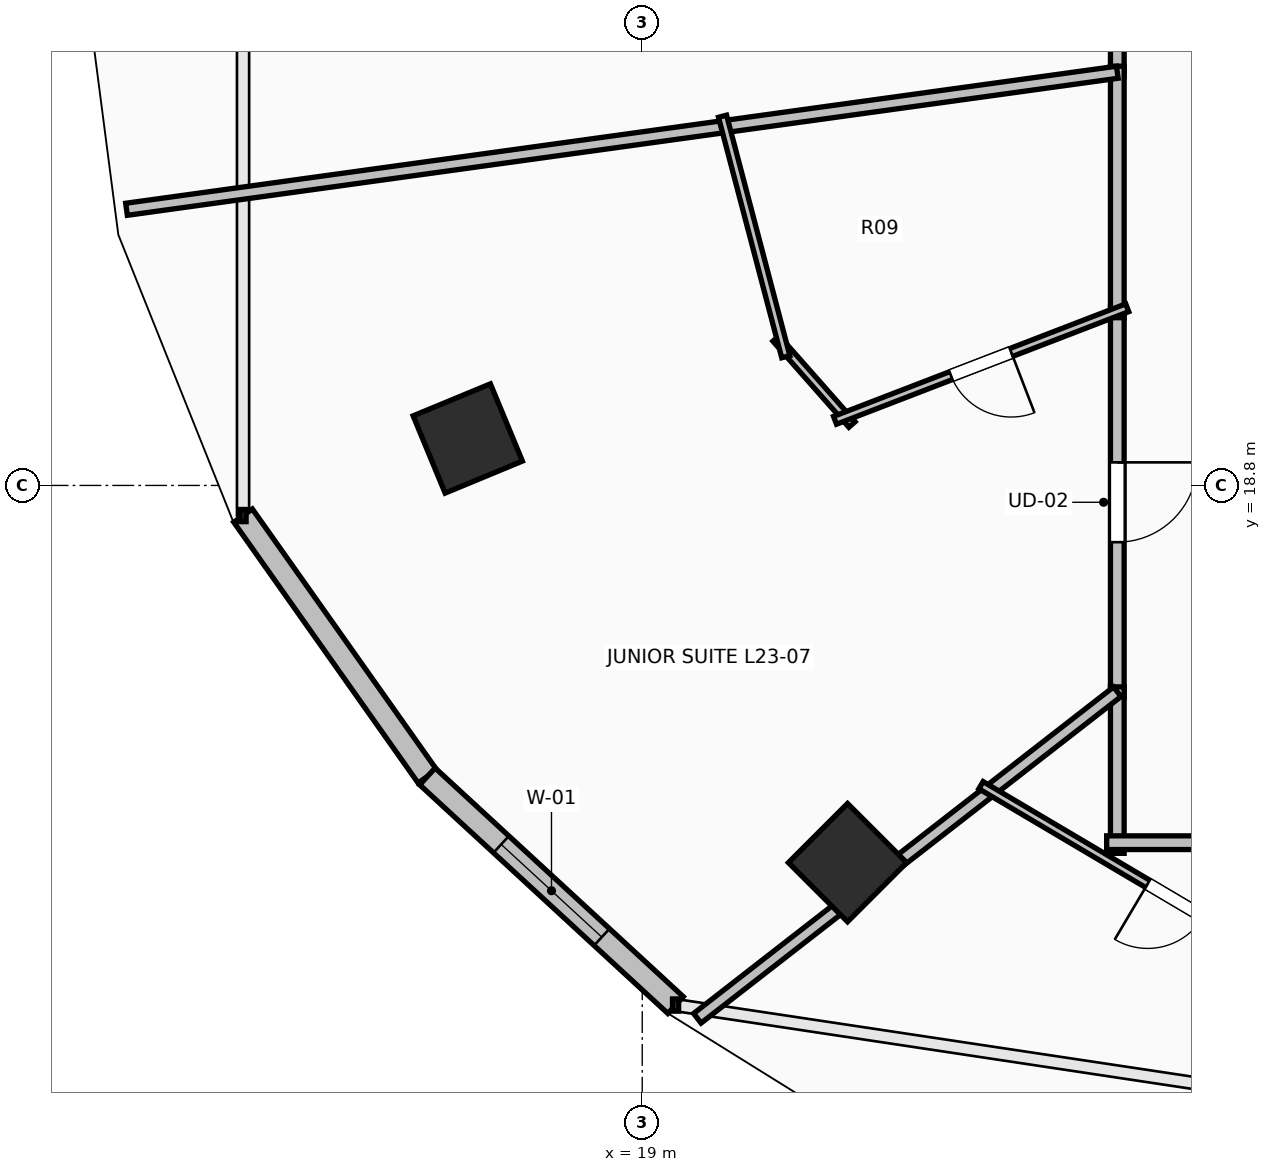
"""IFC4 building model, lengths in metres.
Left out: names, types, materials, properties, quantities, classifications, styles, units other than length and angle.
Written with IfcOpenShell. Run it as: python <this file> out.ifc"""

import sys

from ifc_helpers import new_model, si_unit, direction, frame, frame_2d, origin, origin_2d, place, context, subcontext, project, spatial, rectangle, extrude, element, fill, save


model = new_model("IFC4")
c1 = context("Model", 3, precision=1e-05, world=origin(), true_north=direction((0.0, 1.0)))
c2 = subcontext(c1, "Body", "Model", "MODEL_VIEW")
j1 = project(units=[si_unit("LENGTHUNIT", "METRE"), si_unit("PLANEANGLEUNIT", "RADIAN")], contexts=[c1])
p1 = place(None, origin())
s1 = spatial("IfcSite", under=j1, at=p1, CompositionType="ELEMENT")
p2 = place(p1, origin())
s2 = spatial("IfcBuilding", under=s1, at=p2, CompositionType="ELEMENT")
p3 = place(p2, frame((0.0, 0.0, 89.3)))
s3 = spatial("IfcBuildingStorey", under=s2, at=p3, CompositionType="ELEMENT", Elevation=89.3)
for number, where, z_axis, x_axis in (
    (1, (16.705, 19.418, 0.0), (0.0, 0.0, 1.0), (-0.924, -0.383, 0.0)),
    (2, (21.701, 13.838, 0.0), (0.0, 0.0, 1.0), (-0.707, -0.707, 0.0)),
):
    element("IfcColumn", number, at=place(p3, frame(where, z_axis=z_axis, x_axis=x_axis)), inside=s3, PredefinedType="COLUMN", context=c2, shape_type="SweptSolid", body=[
        extrude(rectangle(XDim=1.1, YDim=1.1, at=origin_2d()), origin(), (0.0, 0.0, 1.0), 3.5),
    ])
p4 = place(p3, frame((13.748, 18.404, 0.0), z_axis=(0.0, 0.0, 1.0), x_axis=(0.57716435238, -0.81662801222, 0.0)))
e3 = element("IfcWall", 3, at=p4, inside=s3, PredefinedType="STANDARD", context=c2, shape_type="SweptSolid", body=[
    extrude(rectangle(XDim=4.202, YDim=0.3, at=frame_2d((2.101, 0.0))), origin(), (0.0, 0.0, 1.0), 3.24),
])
p5 = place(p3, frame((16.174, 14.972, 0.0), z_axis=(0.0, 0.0, 1.0), x_axis=(0.735416718093, -0.677615119924, 0.0)))
e4 = element("IfcWall", 4, at=p5, inside=s3, PredefinedType="STANDARD", context=c2, shape_type="SweptSolid", body=[
    extrude(rectangle(XDim=4.439, YDim=0.3, at=frame_2d((2.22, 0.0))), origin(), (0.0, 0.0, 1.0), 3.24),
])
p6 = place(p5, frame((1.32, 0.0, 0.85)))
e5 = element("IfcOpeningElement", 5, at=p6, cuts=e4, PredefinedType="OPENING", context=c2, shape_type="SweptSolid", body=[
    extrude(rectangle(XDim=1.8, YDim=2.19, at=frame_2d((0.9, 1.095))), frame((0.0, 0.165, 0.0), z_axis=(0.0, -1.0, 0.0), x_axis=(1.0, 0.0, 0.0)), (0.0, 0.0, 1.0), 0.33),
])
p7 = place(p3, frame((25.25, 28.065, 0.0), z_axis=(0.0, 0.0, 1.0), x_axis=(0.0, -1.0, 0.0)))
e6 = element("IfcWall", 6, at=p7, inside=s3, PredefinedType="PARTITIONING", context=c2, shape_type="SweptSolid", body=[
    extrude(rectangle(XDim=3.89, YDim=0.18, at=frame_2d((1.945, 0.0))), origin(), (0.0, 0.0, 1.0), 2.432),
])
p8 = place(p7, frame((1.42, 0.0, 0.0)))
e7 = element("IfcOpeningElement", 7, at=p8, cuts=e6, PredefinedType="OPENING", context=c2, shape_type="SweptSolid", body=[
    extrude(rectangle(XDim=1.05, YDim=2.2, at=frame_2d((0.525, 1.1))), frame((0.0, 0.105, 0.0), z_axis=(0.0, -1.0, 0.0), x_axis=(1.0, 0.0, 0.0)), (0.0, 0.0, 1.0), 0.21),
])
p9 = place(p3, frame((25.25, 21.147, 0.0), z_axis=(0.0, 0.0, 1.0), x_axis=(0.0, -1.0, 0.0)))
e8 = element("IfcWall", 8, at=p9, inside=s3, PredefinedType="PARTITIONING", context=c2, shape_type="SweptSolid", body=[
    extrude(rectangle(XDim=5.137, YDim=0.18, at=frame_2d((2.568, 0.0))), origin(), (0.0, 0.0, 1.0), 2.432),
])
p10 = place(p9, frame((2.043, 0.0, 0.0)))
e9 = element("IfcOpeningElement", 9, at=p10, cuts=e8, PredefinedType="OPENING", context=c2, shape_type="SweptSolid", body=[
    extrude(rectangle(XDim=1.05, YDim=2.2, at=frame_2d((0.525, 1.1))), frame((0.0, 0.105, 0.0), z_axis=(0.0, -1.0, 0.0), x_axis=(1.0, 0.0, 0.0)), (0.0, 0.0, 1.0), 0.21),
])
p11 = place(p3, frame((25.25, 24.315, 0.0), z_axis=(0.0, 0.0, 1.0), x_axis=(0.0, -1.0, 0.0)))
e10 = element("IfcWall", 10, at=p11, inside=s3, PredefinedType="PARTITIONING", context=c2, shape_type="SweptSolid", body=[
    extrude(rectangle(XDim=3.308, YDim=0.18, at=frame_2d((1.654, 0.0))), origin(), (0.0, 0.0, 1.0), 3.24),
])
p12 = place(p3, frame((25.25, 16.15, 0.0), z_axis=(0.0, 0.0, 1.0), x_axis=(0.0, -1.0, 0.0)))
e11 = element("IfcWall", 11, at=p12, inside=s3, PredefinedType="PARTITIONING", context=c2, shape_type="SweptSolid", body=[
    extrude(rectangle(XDim=2.19, YDim=0.18, at=frame_2d((1.095, 0.0))), origin(), (0.0, 0.0, 1.0), 2.432),
])
p13 = place(p3, frame((25.11, 14.1, 0.0), z_axis=(0.0, 0.0, 1.0), x_axis=(1.0, 0.0, 0.0)))
e12 = element("IfcWall", 12, at=p13, inside=s3, PredefinedType="PARTITIONING", context=c2, shape_type="SweptSolid", body=[
    extrude(rectangle(XDim=4.519, YDim=0.18, at=frame_2d((2.259, 0.0))), origin(), (0.0, 0.0, 1.0), 2.432),
])
p14 = place(p3, frame((12.215, 22.433, 0.0), z_axis=(0.0, 0.0, 1.0), x_axis=(0.990569013426, 0.137014705927, 0.0)))
e13 = element("IfcWall", 13, at=p14, inside=s3, PredefinedType="PARTITIONING", context=c2, shape_type="SweptSolid", body=[
    extrude(rectangle(XDim=13.159, YDim=0.16, at=frame_2d((6.58, 0.0))), origin(), (0.0, 0.0, 1.0), 2.677),
])
p15 = place(p3, frame((21.76, 19.602, 0.0), z_axis=(0.0, 0.0, 1.0), x_axis=(-0.661931735756, 0.749564124808, 0.0)))
e14 = element("IfcWall", 14, at=p15, inside=s3, PredefinedType="PARTITIONING", context=c2, shape_type="SweptSolid", body=[
    extrude(rectangle(XDim=1.51, YDim=0.11, at=frame_2d((0.755, 0.0))), origin(), (0.0, 0.0, 1.0), 3.24),
])
p16 = place(p3, frame((20.889, 20.494, 0.0), z_axis=(0.0, 0.0, 1.0), x_axis=(-0.254405137241, 0.967097733502, 0.0)))
e15 = element("IfcWall", 15, at=p16, inside=s3, PredefinedType="PARTITIONING", context=c2, shape_type="SweptSolid", body=[
    extrude(rectangle(XDim=3.271, YDim=0.11, at=frame_2d((1.636, 0.0))), origin(), (0.0, 0.0, 1.0), 2.922),
])
p17 = place(p3, frame((25.381, 21.137, 0.0), z_axis=(0.0, 0.0, 1.0), x_axis=(-0.933189718051, -0.359384126144, 0.0)))
e16 = element("IfcWall", 16, at=p17, inside=s3, PredefinedType="PARTITIONING", context=c2, shape_type="SweptSolid", body=[
    extrude(rectangle(XDim=4.119, YDim=0.11, at=frame_2d((2.06, 0.0))), origin(), (0.0, 0.0, 1.0), 2.972),
])
p18 = place(p17, frame((1.635, 0.0, 0.0)))
e17 = element("IfcOpeningElement", 17, at=p18, cuts=e16, PredefinedType="OPENING", context=c2, shape_type="SweptSolid", body=[
    extrude(rectangle(XDim=0.85, YDim=2.1, at=frame_2d((0.425, 1.05))), frame((0.0, 0.07, 0.0), z_axis=(0.0, -1.0, 0.0), x_axis=(1.0, 0.0, 0.0)), (0.0, 0.0, 1.0), 0.14),
])
p19 = place(p3, frame((19.725, 11.79, 0.0), z_axis=(0.0, 0.0, 1.0), x_axis=(0.789438616042, 0.613829513384, 0.0)))
e18 = element("IfcWall", 18, at=p19, inside=s3, PredefinedType="PARTITIONING", context=c2, shape_type="SweptSolid", body=[
    extrude(rectangle(XDim=6.999, YDim=0.16, at=frame_2d((3.499, 0.0))), origin(), (0.0, 0.0, 1.0), 2.432),
])
p20 = place(p3, frame((27.611, 12.399, 0.0), z_axis=(0.0, 0.0, 1.0), x_axis=(-0.860667615303, 0.509167218081, 0.0)))
e19 = element("IfcWall", 19, at=p20, inside=s3, PredefinedType="PARTITIONING", context=c2, shape_type="SweptSolid", body=[
    extrude(rectangle(XDim=4.827, YDim=0.11, at=frame_2d((2.413, 0.0))), origin(), (0.0, 0.0, 1.0), 2.432),
])
p21 = place(p20, frame((1.428, 0.0, 0.0)))
e20 = element("IfcOpeningElement", 20, at=p21, cuts=e19, PredefinedType="OPENING", context=c2, shape_type="SweptSolid", body=[
    extrude(rectangle(XDim=0.85, YDim=2.1, at=frame_2d((0.425, 1.05))), frame((0.0, 0.07, 0.0), z_axis=(0.0, -1.0, 0.0), x_axis=(1.0, 0.0, 0.0)), (0.0, 0.0, 1.0), 0.14),
])
p22 = place(p6, origin())
e21 = element("IfcWindow", 21, at=p22, inside=s3, PartitioningType="SINGLE_PANEL", PredefinedType="WINDOW", context=c2, shape_type="SweptSolid", body=[
    extrude(rectangle(XDim=1.8, YDim=2.19, at=frame_2d((0.9, 1.095))), frame((0.0, 0.03, 0.0), z_axis=(0.0, -1.0, 0.0), x_axis=(1.0, 0.0, 0.0)), (0.0, 0.0, 1.0), 0.06),
])
fill(e5, e21)
p23 = place(p10, origin())
e22 = element("IfcDoor", 22, at=p23, inside=s3, OperationType="SINGLE_SWING_LEFT", PredefinedType="DOOR", context=c2, shape_type="SweptSolid", body=[
    extrude(rectangle(XDim=1.05, YDim=2.2, at=frame_2d((0.525, 1.1))), frame((0.0, 0.025, 0.0), z_axis=(0.0, -1.0, 0.0), x_axis=(1.0, 0.0, 0.0)), (0.0, 0.0, 1.0), 0.05),
])
fill(e9, e22)
p24 = place(p18, origin())
e23 = element("IfcDoor", 23, at=p24, inside=s3, OperationType="SINGLE_SWING_LEFT", PredefinedType="DOOR", context=c2, shape_type="SweptSolid", body=[
    extrude(rectangle(XDim=0.85, YDim=2.1, at=frame_2d((0.425, 1.05))), frame((0.0, 0.025, 0.0), z_axis=(0.0, -1.0, 0.0), x_axis=(1.0, 0.0, 0.0)), (0.0, 0.0, 1.0), 0.05),
])
fill(e17, e23)
p25 = place(p21, origin())
e24 = element("IfcDoor", 24, at=p25, inside=s3, OperationType="SINGLE_SWING_RIGHT", PredefinedType="DOOR", context=c2, shape_type="SweptSolid", body=[
    extrude(rectangle(XDim=0.85, YDim=2.1, at=frame_2d((0.425, 1.05))), frame((0.0, 0.025, 0.0), z_axis=(0.0, -1.0, 0.0), x_axis=(1.0, 0.0, 0.0)), (0.0, 0.0, 1.0), 0.05),
])
fill(e20, e24)
save(model, sys.argv[1])
